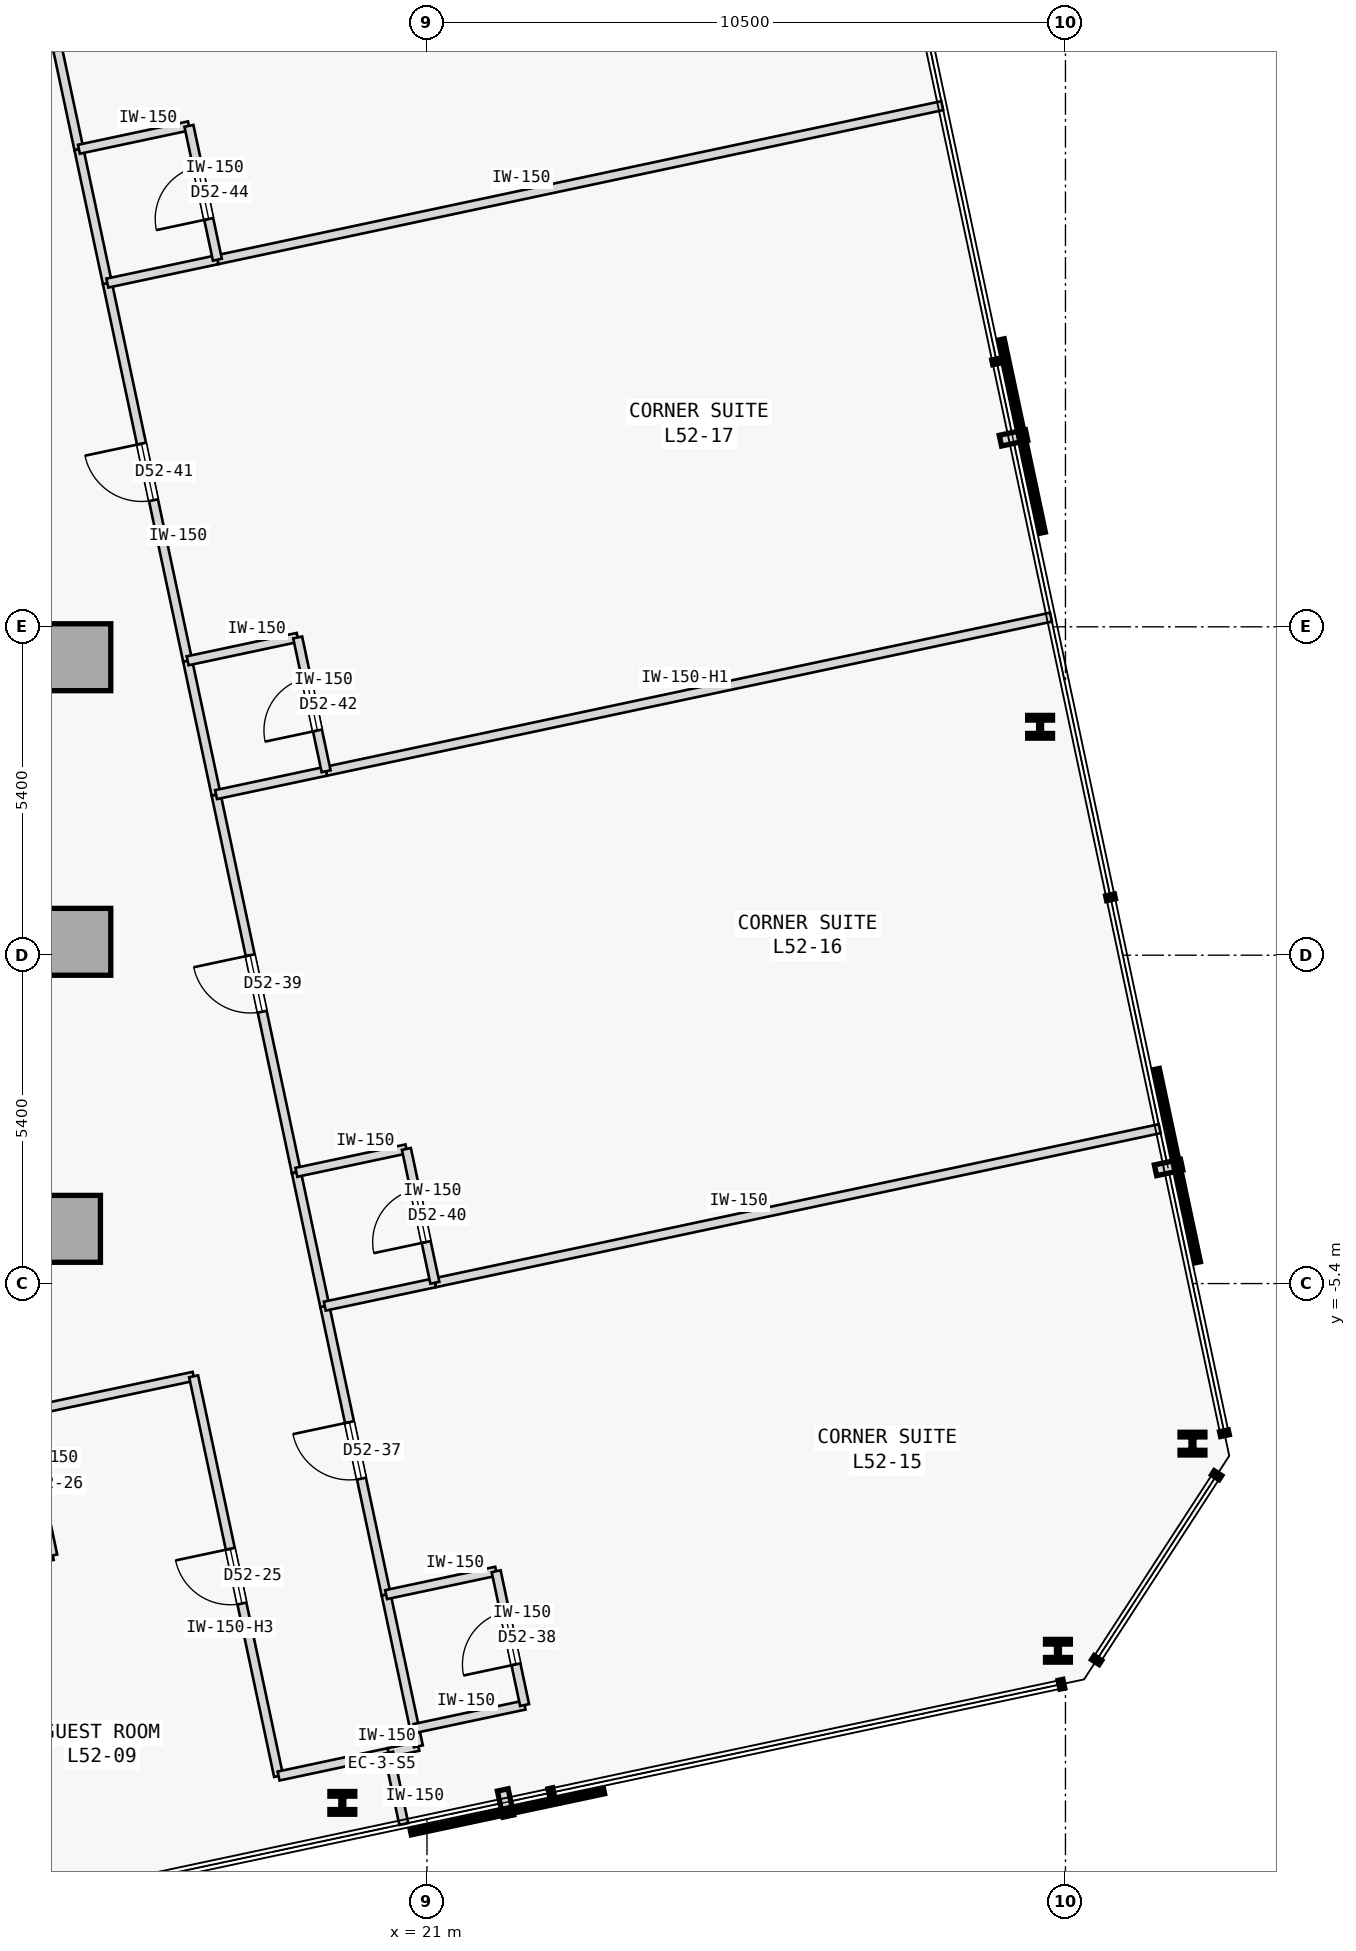
"""IFC4 building model, lengths in metres.
Left out: names, types, materials, properties, quantities, classifications, styles, units other than length and angle.
Written with IfcOpenShell. Run it as: python <this file> out.ifc"""

import sys

from ifc_helpers import new_model, si_unit, direction, frame, frame_2d, origin, origin_2d, place, context, subcontext, project, spatial, rectangle, i_section, extrude, element, fill, save


model = new_model("IFC4")
c1 = context("Model", 3, precision=1e-05, world=origin(), true_north=direction((0.0, 1.0)))
c2 = subcontext(c1, "Body", "Model", "MODEL_VIEW")
j1 = project(units=[si_unit("LENGTHUNIT", "METRE"), si_unit("PLANEANGLEUNIT", "RADIAN")], contexts=[c1])
p1 = place(None, origin())
s1 = spatial("IfcSite", under=j1, at=p1, CompositionType="ELEMENT")
p2 = place(p1, origin())
s2 = spatial("IfcBuilding", under=s1, at=p2, CompositionType="ELEMENT")
p3 = place(p2, frame((0.0, 0.0, 199.0)))
s3 = spatial("IfcBuildingStorey", under=s2, at=p3, CompositionType="ELEMENT", Elevation=199.0)
for number, where, z_axis, x_axis in (
    (1, (15.25, 4.9, 0.0), (0.0, 0.0, 1.0), (1.0, 0.0, 0.0)),
    (2, (15.25, 0.22, 0.0), (0.0, 0.0, 1.0), (1.0, 0.0, 0.0)),
    (3, (15.08, -4.5, 0.0), (0.0, 0.0, 1.0), (1.0, 0.0, 0.0)),
):
    element("IfcColumn", number, at=place(p3, frame(where, z_axis=z_axis, x_axis=x_axis)), inside=s3, PredefinedType="COLUMN", context=c2, shape_type="SweptSolid", body=[
        extrude(rectangle(XDim=1.1, YDim=1.1, at=origin_2d()), origin(), (0.0, 0.0, 1.0), 3.4),
    ])
for number, where, z_axis, x_axis in (
    (4, (19.608, -13.94, 0.0), (0.0, 0.0, 1.0), (1.0, 0.0, 0.0)),
    (5, (31.376, -11.439, 0.0), (0.0, 0.0, 1.0), (1.0, 0.0, 0.0)),
    (6, (33.589, -8.032, 0.0), (0.0, 0.0, 1.0), (1.0, 0.0, 0.0)),
    (7, (31.083, 3.756, 0.0), (0.0, 0.0, 1.0), (1.0, 0.0, 0.0)),
):
    element("IfcColumn", number, at=place(p3, frame(where, z_axis=z_axis, x_axis=x_axis)), inside=s3, PredefinedType="COLUMN", context=c2, shape_type="SweptSolid", body=[
        extrude(i_section(OverallWidth=0.409, OverallDepth=0.374, WebThickness=0.048, FlangeThickness=0.077, FilletRadius=0.015, at=origin_2d()), origin(), (0.0, 0.0, 1.0), 3.4),
    ])
p4 = place(p3, frame((14.346, -7.524, 0.0), z_axis=(0.0, 0.0, 1.0), x_axis=(0.97816208355, 0.207843542851, 0.0)))
e8 = element("IfcWall", 8, at=p4, inside=s3, PredefinedType="PARTITIONING", context=c2, shape_type="SweptSolid", body=[
    extrude(rectangle(XDim=2.879, YDim=0.15, at=frame_2d((1.439, 0.0))), origin(), (0.0, 0.0, 1.0), 3.0),
])
p5 = place(p3, frame((18.56, -13.498, 0.0), z_axis=(0.0, 0.0, 1.0), x_axis=(-0.207888737749, 0.978152479278, 0.0)))
e9 = element("IfcWall", 9, at=p5, inside=s3, PredefinedType="PARTITIONING", context=c2, shape_type="SweptSolid", body=[
    extrude(rectangle(XDim=6.72, YDim=0.15, at=frame_2d((3.36, 0.0))), origin(), (0.0, 0.0, 1.0), 2.22),
])
p6 = place(p5, frame((2.9, 0.0, 0.0)))
e10 = element("IfcOpeningElement", 10, at=p6, cuts=e9, PredefinedType="OPENING", context=c2, shape_type="SweptSolid", body=[
    extrude(rectangle(XDim=0.92, YDim=2.15, at=frame_2d((0.46, 1.075))), frame((0.0, 0.085, 0.0), z_axis=(0.0, -1.0, 0.0), x_axis=(1.0, 0.0, 0.0)), (0.0, 0.0, 1.0), 0.17),
])
p7 = place(p3, frame((18.56, -13.498, 0.0), z_axis=(0.0, 0.0, 1.0), x_axis=(0.978160192495, 0.207852442415, 0.0)))
e11 = element("IfcWall", 11, at=p7, inside=s3, PredefinedType="PARTITIONING", context=c2, shape_type="SweptSolid", body=[
    extrude(rectangle(XDim=1.85, YDim=0.15, at=frame_2d((0.925, 0.0))), origin(), (0.0, 0.0, 1.0), 3.0),
])
p8 = place(p3, frame((20.369, -13.114, 0.0), z_axis=(0.0, 0.0, 1.0), x_axis=(0.978143962546, 0.207928806409, 0.0)))
e12 = element("IfcWall", 12, at=p8, inside=s3, PredefinedType="PARTITIONING", context=c2, shape_type="SweptSolid", body=[
    extrude(rectangle(XDim=0.5, YDim=0.15, at=frame_2d((0.25, 0.0))), origin(), (0.0, 0.0, 1.0), 3.0),
])
p9 = place(p3, frame((20.858, -13.01, 0.0), z_axis=(0.0, 0.0, 1.0), x_axis=(-0.208306395052, 0.978063620518, 0.0)))
e13 = element("IfcWall", 13, at=p9, inside=s3, PredefinedType="PARTITIONING", context=c2, shape_type="SweptSolid", body=[
    extrude(rectangle(XDim=0.3, YDim=0.15, at=frame_2d((0.15, 0.0))), origin(), (0.0, 0.0, 1.0), 3.0),
])
p10 = place(p3, frame((20.328, -10.515, 0.0), z_axis=(0.0, 0.0, 1.0), x_axis=(-0.207950868925, 0.97813927235, 0.0)))
e14 = element("IfcWall", 14, at=p10, inside=s3, PredefinedType="PARTITIONING", context=c2, shape_type="SweptSolid", body=[
    extrude(rectangle(XDim=4.85, YDim=0.15, at=frame_2d((2.425, 0.0))), origin(), (0.0, 0.0, 1.0), 3.0),
])
p11 = place(p10, frame((1.95, 0.0, 0.0)))
e15 = element("IfcOpeningElement", 15, at=p11, cuts=e14, PredefinedType="OPENING", context=c2, shape_type="SweptSolid", body=[
    extrude(rectangle(XDim=0.95, YDim=2.15, at=frame_2d((0.475, 1.075))), frame((0.0, 0.085, 0.0), z_axis=(0.0, -1.0, 0.0), x_axis=(1.0, 0.0, 0.0)), (0.0, 0.0, 1.0), 0.17),
])
p12 = place(p3, frame((20.796, -12.716, 0.0), z_axis=(0.0, 0.0, 1.0), x_axis=(-0.207891197838, 0.978151956427, 0.0)))
e16 = element("IfcWall", 16, at=p12, inside=s3, PredefinedType="PARTITIONING", context=c2, shape_type="SweptSolid", body=[
    extrude(rectangle(XDim=2.25, YDim=0.15, at=frame_2d((1.125, 0.0))), origin(), (0.0, 0.0, 1.0), 3.0),
])
p13 = place(p3, frame((18.852, -3.571, 0.0), z_axis=(0.0, 0.0, 1.0), x_axis=(-0.207879907349, 0.978154355979, 0.0)))
e17 = element("IfcWall", 17, at=p13, inside=s3, PredefinedType="PARTITIONING", context=c2, shape_type="SweptSolid", body=[
    extrude(rectangle(XDim=6.35, YDim=0.15, at=frame_2d((3.175, 0.0))), origin(), (0.0, 0.0, 1.0), 3.0),
])
p14 = place(p13, frame((2.7, 0.0, 0.0)))
e18 = element("IfcOpeningElement", 18, at=p14, cuts=e17, PredefinedType="OPENING", context=c2, shape_type="SweptSolid", body=[
    extrude(rectangle(XDim=0.95, YDim=2.15, at=frame_2d((0.475, 1.075))), frame((0.0, 0.085, 0.0), z_axis=(0.0, -1.0, 0.0), x_axis=(1.0, 0.0, 0.0)), (0.0, 0.0, 1.0), 0.17),
])
p15 = place(p3, frame((19.32, -5.771, 0.0), z_axis=(0.0, 0.0, 1.0), x_axis=(-0.207913264065, 0.978147266328, 0.0)))
e19 = element("IfcWall", 19, at=p15, inside=s3, PredefinedType="PARTITIONING", context=c2, shape_type="SweptSolid", body=[
    extrude(rectangle(XDim=2.25, YDim=0.15, at=frame_2d((1.125, 0.0))), origin(), (0.0, 0.0, 1.0), 3.0),
])
p16 = place(p3, frame((17.064, 4.841, 0.0), z_axis=(0.0, 0.0, 1.0), x_axis=(-0.207924511115, 0.978144875608, 0.0)))
e20 = element("IfcWall", 20, at=p16, inside=s3, PredefinedType="PARTITIONING", context=c2, shape_type="SweptSolid", body=[
    extrude(rectangle(XDim=6.35, YDim=0.15, at=frame_2d((3.175, 0.0))), origin(), (0.0, 0.0, 1.0), 3.0),
])
p17 = place(p16, frame((2.7, 0.0, 0.0)))
e21 = element("IfcOpeningElement", 21, at=p17, cuts=e20, PredefinedType="OPENING", context=c2, shape_type="SweptSolid", body=[
    extrude(rectangle(XDim=0.95, YDim=2.15, at=frame_2d((0.475, 1.075))), frame((0.0, 0.085, 0.0), z_axis=(0.0, -1.0, 0.0), x_axis=(1.0, 0.0, 0.0)), (0.0, 0.0, 1.0), 0.17),
])
p18 = place(p3, frame((17.532, 2.641, 0.0), z_axis=(0.0, 0.0, 1.0), x_axis=(-0.207913264065, 0.978147266328, 0.0)))
e22 = element("IfcWall", 22, at=p18, inside=s3, PredefinedType="PARTITIONING", context=c2, shape_type="SweptSolid", body=[
    extrude(rectangle(XDim=2.25, YDim=0.15, at=frame_2d((1.125, 0.0))), origin(), (0.0, 0.0, 1.0), 3.0),
])
p19 = place(p3, frame((15.276, 13.253, 0.0), z_axis=(0.0, 0.0, 1.0), x_axis=(-0.207924511115, 0.978144875608, 0.0)))
e23 = element("IfcWall", 23, at=p19, inside=s3, PredefinedType="PARTITIONING", context=c2, shape_type="SweptSolid", body=[
    extrude(rectangle(XDim=6.35, YDim=0.15, at=frame_2d((3.175, 0.0))), origin(), (0.0, 0.0, 1.0), 3.0),
])
p20 = place(p19, frame((2.7, 0.0, 0.0)))
e24 = element("IfcOpeningElement", 24, at=p20, cuts=e23, PredefinedType="OPENING", context=c2, shape_type="SweptSolid", body=[
    extrude(rectangle(XDim=0.95, YDim=2.15, at=frame_2d((0.475, 1.075))), frame((0.0, 0.085, 0.0), z_axis=(0.0, -1.0, 0.0), x_axis=(1.0, 0.0, 0.0)), (0.0, 0.0, 1.0), 0.17),
])
p21 = place(p3, frame((15.744, 11.052, 0.0), z_axis=(0.0, 0.0, 1.0), x_axis=(-0.207891197838, 0.978151956427, 0.0)))
e25 = element("IfcWall", 25, at=p21, inside=s3, PredefinedType="PARTITIONING", context=c2, shape_type="SweptSolid", body=[
    extrude(rectangle(XDim=2.25, YDim=0.15, at=frame_2d((1.125, 0.0))), origin(), (0.0, 0.0, 1.0), 3.0),
])
p22 = place(p3, frame((12.742, -10.318, 0.0), z_axis=(0.0, 0.0, 1.0), x_axis=(0.978146728319, 0.207915795165, 0.0)))
e26 = element("IfcWall", 26, at=p22, inside=s3, PredefinedType="PARTITIONING", context=c2, shape_type="SweptSolid", body=[
    extrude(rectangle(XDim=2.15, YDim=0.15, at=frame_2d((1.075, 0.0))), origin(), (0.0, 0.0, 1.0), 3.0),
])
p23 = place(p3, frame((14.845, -9.871, 0.0), z_axis=(0.0, 0.0, 1.0), x_axis=(-0.207917150959, 0.978146440129, 0.0)))
e27 = element("IfcWall", 27, at=p23, inside=s3, PredefinedType="PARTITIONING", context=c2, shape_type="SweptSolid", body=[
    extrude(rectangle(XDim=2.4, YDim=0.15, at=frame_2d((1.2, 0.0))), origin(), (0.0, 0.0, 1.0), 3.0),
])
p24 = place(p23, frame((0.76, 0.0, 0.0)))
e28 = element("IfcOpeningElement", 28, at=p24, cuts=e27, PredefinedType="OPENING", context=c2, shape_type="SweptSolid", body=[
    extrude(rectangle(XDim=0.88, YDim=2.15, at=frame_2d((0.44, 1.075))), frame((0.0, 0.085, 0.0), z_axis=(0.0, -1.0, 0.0), x_axis=(1.0, 0.0, 0.0)), (0.0, 0.0, 1.0), 0.17),
])
p25 = place(p3, frame((20.619, -14.288, 0.0), z_axis=(0.0, 0.0, 1.0), x_axis=(-0.207917150959, 0.978146440129, 0.0)))
e29 = element("IfcWall", 29, at=p25, inside=s3, PredefinedType="PARTITIONING", context=c2, shape_type="SweptSolid", body=[
    extrude(rectangle(XDim=1.2, YDim=0.15, at=frame_2d((0.6, 0.0))), origin(), (0.0, 0.0, 1.0), 3.0),
])
for number, where, z_axis, x_axis in (
    (30, (20.796, -12.716, 0.0), (0.0, 0.0, 1.0), (0.978, 0.208, 0.0)),
    (31, (20.328, -10.515, 0.0), (0.0, 0.0, 1.0), (0.978, 0.208, 0.0)),
):
    element("IfcWall", number, at=place(p3, frame(where, z_axis=z_axis, x_axis=x_axis)), inside=s3, PredefinedType="PARTITIONING", context=c2, shape_type="SweptSolid", body=[
        extrude(rectangle(XDim=1.85, YDim=0.15, at=frame_2d((0.925, 0.0))), origin(), (0.0, 0.0, 1.0), 3.0),
    ])
p26 = place(p3, frame((22.605, -12.332, 0.0), z_axis=(0.0, 0.0, 1.0), x_axis=(-0.207891197838, 0.978151956427, 0.0)))
e32 = element("IfcWall", 32, at=p26, inside=s3, PredefinedType="PARTITIONING", context=c2, shape_type="SweptSolid", body=[
    extrude(rectangle(XDim=2.25, YDim=0.15, at=frame_2d((1.125, 0.0))), origin(), (0.0, 0.0, 1.0), 3.0),
])
p27 = place(p26, frame((0.685, 0.0, 0.0)))
e33 = element("IfcOpeningElement", 33, at=p27, cuts=e32, PredefinedType="OPENING", context=c2, shape_type="SweptSolid", body=[
    extrude(rectangle(XDim=0.88, YDim=2.15, at=frame_2d((0.44, 1.075))), frame((0.0, 0.085, 0.0), z_axis=(0.0, -1.0, 0.0), x_axis=(1.0, 0.0, 0.0)), (0.0, 0.0, 1.0), 0.17),
])
p28 = place(p3, frame((21.129, -5.387, 0.0), z_axis=(0.0, 0.0, 1.0), x_axis=(0.97814556055, 0.207921288896, 0.0)))
e34 = element("IfcWall", 34, at=p28, inside=s3, PredefinedType="PARTITIONING", context=c2, shape_type="SweptSolid", body=[
    extrude(rectangle(XDim=12.187, YDim=0.15, at=frame_2d((6.094, 0.0))), origin(), (0.0, 0.0, 1.0), 3.0),
])
p29 = place(p3, frame((19.32, -5.771, 0.0), z_axis=(0.0, 0.0, 1.0), x_axis=(0.978165892835, 0.207825614625, 0.0)))
e35 = element("IfcWall", 35, at=p29, inside=s3, PredefinedType="PARTITIONING", context=c2, shape_type="SweptSolid", body=[
    extrude(rectangle(XDim=1.85, YDim=0.15, at=frame_2d((0.925, 0.0))), origin(), (0.0, 0.0, 1.0), 3.0),
])
p30 = place(p3, frame((18.852, -3.571, 0.0), z_axis=(0.0, 0.0, 1.0), x_axis=(0.978139061018, 0.207951862966, 0.0)))
e36 = element("IfcWall", 36, at=p30, inside=s3, PredefinedType="PARTITIONING", context=c2, shape_type="SweptSolid", body=[
    extrude(rectangle(XDim=1.85, YDim=0.15, at=frame_2d((0.925, 0.0))), origin(), (0.0, 0.0, 1.0), 3.0),
])
p31 = place(p3, frame((21.129, -5.387, 0.0), z_axis=(0.0, 0.0, 1.0), x_axis=(-0.207891197838, 0.978151956427, 0.0)))
e37 = element("IfcWall", 37, at=p31, inside=s3, PredefinedType="PARTITIONING", context=c2, shape_type="SweptSolid", body=[
    extrude(rectangle(XDim=2.25, YDim=0.15, at=frame_2d((1.125, 0.0))), origin(), (0.0, 0.0, 1.0), 3.0),
])
p32 = place(p31, frame((0.685, 0.0, 0.0)))
e38 = element("IfcOpeningElement", 38, at=p32, cuts=e37, PredefinedType="OPENING", context=c2, shape_type="SweptSolid", body=[
    extrude(rectangle(XDim=0.88, YDim=2.15, at=frame_2d((0.44, 1.075))), frame((0.0, 0.085, 0.0), z_axis=(0.0, -1.0, 0.0), x_axis=(1.0, 0.0, 0.0)), (0.0, 0.0, 1.0), 0.17),
])
p33 = place(p3, frame((19.341, 3.025, 0.0), z_axis=(0.0, 0.0, 1.0), x_axis=(0.97814556055, 0.207921288896, 0.0)))
e39 = element("IfcWall", 39, at=p33, inside=s3, PredefinedType="PARTITIONING", context=c2, shape_type="SweptSolid", body=[
    extrude(rectangle(XDim=12.187, YDim=0.15, at=frame_2d((6.094, 0.0))), origin(), (0.0, 0.0, 1.0), 2.55),
])
p34 = place(p3, frame((17.532, 2.641, 0.0), z_axis=(0.0, 0.0, 1.0), x_axis=(0.978160192495, 0.207852442415, 0.0)))
e40 = element("IfcWall", 40, at=p34, inside=s3, PredefinedType="PARTITIONING", context=c2, shape_type="SweptSolid", body=[
    extrude(rectangle(XDim=1.85, YDim=0.15, at=frame_2d((0.925, 0.0))), origin(), (0.0, 0.0, 1.0), 3.0),
])
p35 = place(p3, frame((17.064, 4.841, 0.0), z_axis=(0.0, 0.0, 1.0), x_axis=(0.978133353907, 0.20797870558, 0.0)))
e41 = element("IfcWall", 41, at=p35, inside=s3, PredefinedType="PARTITIONING", context=c2, shape_type="SweptSolid", body=[
    extrude(rectangle(XDim=1.85, YDim=0.15, at=frame_2d((0.925, 0.0))), origin(), (0.0, 0.0, 1.0), 3.0),
])
p36 = place(p3, frame((19.341, 3.025, 0.0), z_axis=(0.0, 0.0, 1.0), x_axis=(-0.207891197838, 0.978151956427, 0.0)))
e42 = element("IfcWall", 42, at=p36, inside=s3, PredefinedType="PARTITIONING", context=c2, shape_type="SweptSolid", body=[
    extrude(rectangle(XDim=2.25, YDim=0.15, at=frame_2d((1.125, 0.0))), origin(), (0.0, 0.0, 1.0), 3.0),
])
p37 = place(p36, frame((0.685, 0.0, 0.0)))
e43 = element("IfcOpeningElement", 43, at=p37, cuts=e42, PredefinedType="OPENING", context=c2, shape_type="SweptSolid", body=[
    extrude(rectangle(XDim=0.88, YDim=2.15, at=frame_2d((0.44, 1.075))), frame((0.0, 0.085, 0.0), z_axis=(0.0, -1.0, 0.0), x_axis=(1.0, 0.0, 0.0)), (0.0, 0.0, 1.0), 0.17),
])
p38 = place(p3, frame((17.553, 11.437, 0.0), z_axis=(0.0, 0.0, 1.0), x_axis=(0.97814556055, 0.207921288896, 0.0)))
e44 = element("IfcWall", 44, at=p38, inside=s3, PredefinedType="PARTITIONING", context=c2, shape_type="SweptSolid", body=[
    extrude(rectangle(XDim=12.187, YDim=0.15, at=frame_2d((6.094, 0.0))), origin(), (0.0, 0.0, 1.0), 3.0),
])
for number, where, z_axis, x_axis in (
    (45, (15.744, 11.052, 0.0), (0.0, 0.0, 1.0), (0.978, 0.208, 0.0)),
    (46, (15.276, 13.253, 0.0), (0.0, 0.0, 1.0), (0.978, 0.208, 0.0)),
):
    element("IfcWall", number, at=place(p3, frame(where, z_axis=z_axis, x_axis=x_axis)), inside=s3, PredefinedType="PARTITIONING", context=c2, shape_type="SweptSolid", body=[
        extrude(rectangle(XDim=1.85, YDim=0.15, at=frame_2d((0.925, 0.0))), origin(), (0.0, 0.0, 1.0), 3.0),
    ])
p39 = place(p3, frame((17.553, 11.437, 0.0), z_axis=(0.0, 0.0, 1.0), x_axis=(-0.207891197838, 0.978151956427, 0.0)))
e47 = element("IfcWall", 47, at=p39, inside=s3, PredefinedType="PARTITIONING", context=c2, shape_type="SweptSolid", body=[
    extrude(rectangle(XDim=2.25, YDim=0.15, at=frame_2d((1.125, 0.0))), origin(), (0.0, 0.0, 1.0), 3.0),
])
p40 = place(p39, frame((0.685, 0.0, 0.0)))
e48 = element("IfcOpeningElement", 48, at=p40, cuts=e47, PredefinedType="OPENING", context=c2, shape_type="SweptSolid", body=[
    extrude(rectangle(XDim=0.88, YDim=2.15, at=frame_2d((0.44, 1.075))), frame((0.0, 0.085, 0.0), z_axis=(0.0, -1.0, 0.0), x_axis=(1.0, 0.0, 0.0)), (0.0, 0.0, 1.0), 0.17),
])
p41 = place(p6, origin())
e49 = element("IfcDoor", 49, at=p41, inside=s3, OperationType="SINGLE_SWING_RIGHT", PredefinedType="DOOR", context=c2, shape_type="SweptSolid", body=[
    extrude(rectangle(XDim=0.92, YDim=2.15, at=frame_2d((0.46, 1.075))), frame((0.0, 0.025, 0.0), z_axis=(0.0, -1.0, 0.0), x_axis=(1.0, 0.0, 0.0)), (0.0, 0.0, 1.0), 0.05),
])
fill(e10, e49)
p42 = place(p11, origin())
e50 = element("IfcDoor", 50, at=p42, inside=s3, OperationType="SINGLE_SWING_RIGHT", PredefinedType="DOOR", context=c2, shape_type="SweptSolid", body=[
    extrude(rectangle(XDim=0.95, YDim=2.15, at=frame_2d((0.475, 1.075))), frame((0.0, 0.025, 0.0), z_axis=(0.0, -1.0, 0.0), x_axis=(1.0, 0.0, 0.0)), (0.0, 0.0, 1.0), 0.05),
])
fill(e15, e50)
p43 = place(p27, origin())
e51 = element("IfcDoor", 51, at=p43, inside=s3, OperationType="SINGLE_SWING_LEFT", PredefinedType="DOOR", context=c2, shape_type="SweptSolid", body=[
    extrude(rectangle(XDim=0.88, YDim=2.15, at=frame_2d((0.44, 1.075))), frame((0.0, 0.025, 0.0), z_axis=(0.0, -1.0, 0.0), x_axis=(1.0, 0.0, 0.0)), (0.0, 0.0, 1.0), 0.05),
])
fill(e33, e51)
p44 = place(p14, origin())
e52 = element("IfcDoor", 52, at=p44, inside=s3, OperationType="SINGLE_SWING_RIGHT", PredefinedType="DOOR", context=c2, shape_type="SweptSolid", body=[
    extrude(rectangle(XDim=0.95, YDim=2.15, at=frame_2d((0.475, 1.075))), frame((0.0, 0.025, 0.0), z_axis=(0.0, -1.0, 0.0), x_axis=(1.0, 0.0, 0.0)), (0.0, 0.0, 1.0), 0.05),
])
fill(e18, e52)
p45 = place(p32, origin())
e53 = element("IfcDoor", 53, at=p45, inside=s3, OperationType="SINGLE_SWING_LEFT", PredefinedType="DOOR", context=c2, shape_type="SweptSolid", body=[
    extrude(rectangle(XDim=0.88, YDim=2.15, at=frame_2d((0.44, 1.075))), frame((0.0, 0.025, 0.0), z_axis=(0.0, -1.0, 0.0), x_axis=(1.0, 0.0, 0.0)), (0.0, 0.0, 1.0), 0.05),
])
fill(e38, e53)
p46 = place(p17, origin())
e54 = element("IfcDoor", 54, at=p46, inside=s3, OperationType="SINGLE_SWING_RIGHT", PredefinedType="DOOR", context=c2, shape_type="SweptSolid", body=[
    extrude(rectangle(XDim=0.95, YDim=2.15, at=frame_2d((0.475, 1.075))), frame((0.0, 0.025, 0.0), z_axis=(0.0, -1.0, 0.0), x_axis=(1.0, 0.0, 0.0)), (0.0, 0.0, 1.0), 0.05),
])
fill(e21, e54)
p47 = place(p37, origin())
e55 = element("IfcDoor", 55, at=p47, inside=s3, OperationType="SINGLE_SWING_LEFT", PredefinedType="DOOR", context=c2, shape_type="SweptSolid", body=[
    extrude(rectangle(XDim=0.88, YDim=2.15, at=frame_2d((0.44, 1.075))), frame((0.0, 0.025, 0.0), z_axis=(0.0, -1.0, 0.0), x_axis=(1.0, 0.0, 0.0)), (0.0, 0.0, 1.0), 0.05),
])
fill(e43, e55)
p48 = place(p40, origin())
e56 = element("IfcDoor", 56, at=p48, inside=s3, OperationType="SINGLE_SWING_LEFT", PredefinedType="DOOR", context=c2, shape_type="SweptSolid", body=[
    extrude(rectangle(XDim=0.88, YDim=2.15, at=frame_2d((0.44, 1.075))), frame((0.0, 0.025, 0.0), z_axis=(0.0, -1.0, 0.0), x_axis=(1.0, 0.0, 0.0)), (0.0, 0.0, 1.0), 0.05),
])
fill(e48, e56)
save(model, sys.argv[1])
